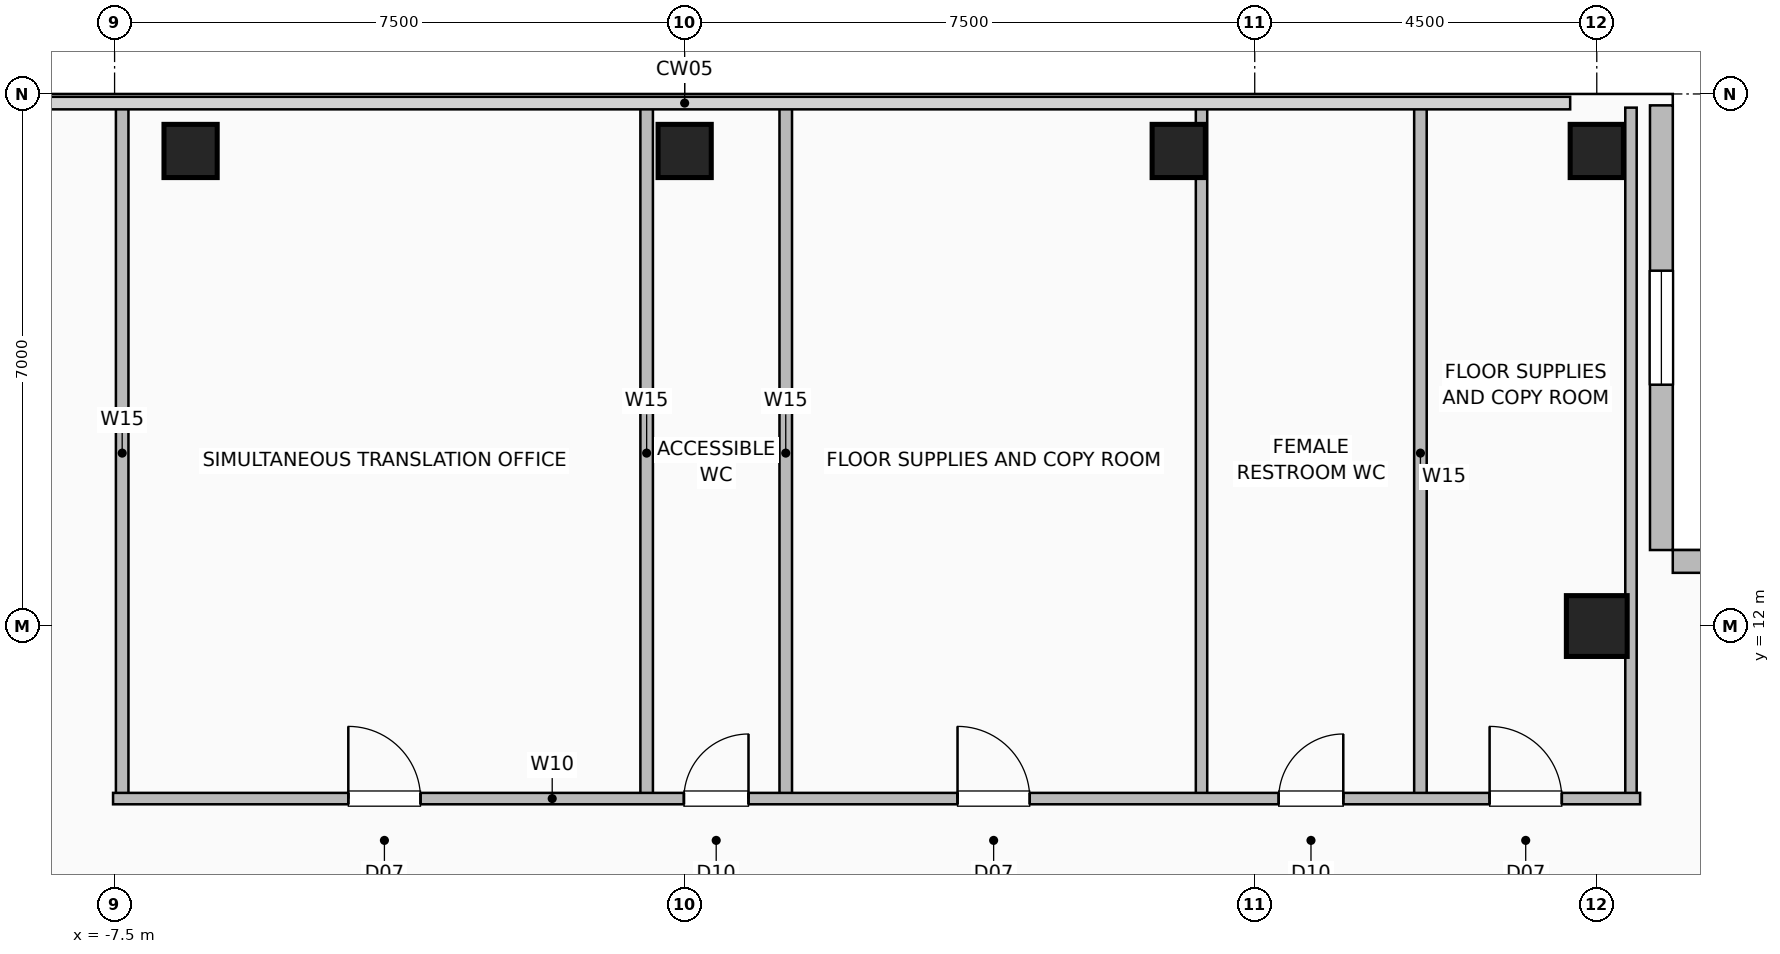
"""IFC4 building model, lengths in metres.
Left out: names, types, materials, properties, quantities, classifications, styles, units other than length and angle.
Written with IfcOpenShell. Run it as: python <this file> out.ifc"""

import sys

from ifc_helpers import new_model, si_unit, direction, frame, frame_2d, origin, origin_2d, place, context, subcontext, project, spatial, rectangle, hollow_rectangle, extrude, element, fill, save


model = new_model("IFC4")
c1 = context("Model", 3, precision=1e-05, world=origin(), true_north=direction((0.0, 1.0)))
c2 = subcontext(c1, "Body", "Model", "MODEL_VIEW")
j1 = project(units=[si_unit("LENGTHUNIT", "METRE"), si_unit("PLANEANGLEUNIT", "RADIAN")], contexts=[c1])
p1 = place(None, origin())
s1 = spatial("IfcSite", under=j1, at=p1, CompositionType="ELEMENT")
p2 = place(p1, origin())
s2 = spatial("IfcBuilding", under=s1, at=p2, CompositionType="ELEMENT")
p3 = place(p2, frame((0.0, 0.0, 243.2)))
s3 = spatial("IfcBuildingStorey", under=s2, at=p3, CompositionType="ELEMENT", Elevation=243.2)
for number, where, z_axis, x_axis in (
    (1, (-6.5, 18.25, 0.0), (0.0, 0.0, 1.0), (1.0, 0.0, 0.0)),
    (2, (0.0, 18.25, 0.0), (0.0, 0.0, 1.0), (1.0, 0.0, 0.0)),
    (3, (6.5, 18.25, 0.0), (0.0, 0.0, 1.0), (1.0, 0.0, 0.0)),
    (4, (12.0, 18.25, 0.0), (0.0, 0.0, 1.0), (1.0, 0.0, 0.0)),
):
    element("IfcColumn", number, at=place(p3, frame(where, z_axis=z_axis, x_axis=x_axis)), inside=s3, PredefinedType="COLUMN", context=c2, shape_type="SweptSolid", body=[
        extrude(hollow_rectangle(XDim=0.7, YDim=0.7, WallThickness=0.035, at=origin_2d()), origin(), (0.0, 0.0, 1.0), 3.6),
    ])
p4 = place(p3, frame((12.0, 12.0, 0.0), z_axis=(0.0, 0.0, 1.0), x_axis=(1.0, 0.0, 0.0)))
e5 = element("IfcColumn", 5, at=p4, inside=s3, PredefinedType="COLUMN", context=c2, shape_type="SweptSolid", body=[
    extrude(hollow_rectangle(XDim=0.8, YDim=0.8, WallThickness=0.04, at=origin_2d()), origin(), (0.0, 0.0, 1.0), 3.6),
])
p5 = place(p3, frame((12.85, 18.85, 0.0), z_axis=(0.0, 0.0, 1.0), x_axis=(0.0, -1.0, 0.0)))
e6 = element("IfcWall", 6, at=p5, inside=s3, PredefinedType="SOLIDWALL", context=c2, shape_type="SweptSolid", body=[
    extrude(rectangle(XDim=5.85, YDim=0.3, at=frame_2d((2.925, 0.0))), origin(), (0.0, 0.0, 1.0), 3.36),
])
p6 = place(p5, frame((2.175, 0.0, 0.9)))
e7 = element("IfcOpeningElement", 7, at=p6, cuts=e6, PredefinedType="OPENING", context=c2, shape_type="SweptSolid", body=[
    extrude(rectangle(XDim=1.5, YDim=1.8, at=frame_2d((0.75, 0.9))), frame((0.0, 0.16, 0.0), z_axis=(0.0, -1.0, 0.0), x_axis=(1.0, 0.0, 0.0)), (0.0, 0.0, 1.0), 0.32),
])
p7 = place(p3, frame((18.85, 12.85, 0.0), z_axis=(0.0, 0.0, 1.0), x_axis=(-1.0, 0.0, 0.0)))
e8 = element("IfcWall", 8, at=p7, inside=s3, PredefinedType="SOLIDWALL", context=c2, shape_type="SweptSolid", body=[
    extrude(rectangle(XDim=5.85, YDim=0.3, at=frame_2d((2.925, 0.0))), origin(), (0.0, 0.0, 1.0), 3.36),
])
for number, where, z_axis, x_axis in (
    (9, (1.33, 9.73, 0.0), (0.0, 0.0, 1.0), (0.0, 1.0, 0.0)),
    (10, (9.68, 9.73, 0.0), (0.0, 0.0, 1.0), (0.0, 1.0, 0.0)),
    (11, (-7.4, 9.73, 0.0), (0.0, 0.0, 1.0), (0.0, 1.0, 0.0)),
    (12, (-0.5, 9.73, 0.0), (0.0, 0.0, 1.0), (0.0, 1.0, 0.0)),
):
    element("IfcWall", number, at=place(p3, frame(where, z_axis=z_axis, x_axis=x_axis)), inside=s3, PredefinedType="PLUMBINGWALL", context=c2, shape_type="SweptSolid", body=[
        extrude(rectangle(XDim=9.09, YDim=0.165, at=frame_2d((4.545, 0.0))), origin(), (0.0, 0.0, 1.0), 3.36),
    ])
for number, where, z_axis, x_axis in (
    (13, (6.8, 9.73, 0.0), (0.0, 0.0, 1.0), (0.0, 1.0, 0.0)),
    (14, (12.45, 9.73, 0.0), (0.0, 0.0, 1.0), (0.0, 1.0, 0.0)),
):
    element("IfcWall", number, at=place(p3, frame(where, z_axis=z_axis, x_axis=x_axis)), inside=s3, PredefinedType="PARTITIONING", context=c2, shape_type="SweptSolid", body=[
        extrude(rectangle(XDim=9.09, YDim=0.15, at=frame_2d((4.545, 0.0))), origin(), (0.0, 0.0, 1.0), 3.36),
    ])
p8 = place(p3, frame((-7.52, 9.73, 0.0), z_axis=(0.0, 0.0, 1.0), x_axis=(1.0, 0.0, 0.0)))
e15 = element("IfcWall", 15, at=p8, inside=s3, PredefinedType="PARTITIONING", context=c2, shape_type="SweptSolid", body=[
    extrude(rectangle(XDim=20.09, YDim=0.15, at=frame_2d((10.045, 0.0))), origin(), (0.0, 0.0, 1.0), 3.36),
])
p9 = place(p8, frame((3.095, 0.0, 0.0)))
e16 = element("IfcOpeningElement", 16, at=p9, cuts=e15, PredefinedType="OPENING", context=c2, shape_type="SweptSolid", body=[
    extrude(rectangle(XDim=0.95, YDim=2.06, at=frame_2d((0.475, 1.03))), frame((0.0, 0.085, 0.0), z_axis=(0.0, -1.0, 0.0), x_axis=(1.0, 0.0, 0.0)), (0.0, 0.0, 1.0), 0.17),
])
p10 = place(p8, frame((7.51, 0.0, 0.0)))
e17 = element("IfcOpeningElement", 17, at=p10, cuts=e15, PredefinedType="OPENING", context=c2, shape_type="SweptSolid", body=[
    extrude(rectangle(XDim=0.85, YDim=2.05, at=frame_2d((0.425, 1.025))), frame((0.0, 0.085, 0.0), z_axis=(0.0, -1.0, 0.0), x_axis=(1.0, 0.0, 0.0)), (0.0, 0.0, 1.0), 0.17),
])
p11 = place(p8, frame((11.11, 0.0, 0.0)))
e18 = element("IfcOpeningElement", 18, at=p11, cuts=e15, PredefinedType="OPENING", context=c2, shape_type="SweptSolid", body=[
    extrude(rectangle(XDim=0.95, YDim=2.06, at=frame_2d((0.475, 1.03))), frame((0.0, 0.085, 0.0), z_axis=(0.0, -1.0, 0.0), x_axis=(1.0, 0.0, 0.0)), (0.0, 0.0, 1.0), 0.17),
])
p12 = place(p8, frame((15.335, 0.0, 0.0)))
e19 = element("IfcOpeningElement", 19, at=p12, cuts=e15, PredefinedType="OPENING", context=c2, shape_type="SweptSolid", body=[
    extrude(rectangle(XDim=0.85, YDim=2.05, at=frame_2d((0.425, 1.025))), frame((0.0, 0.085, 0.0), z_axis=(0.0, -1.0, 0.0), x_axis=(1.0, 0.0, 0.0)), (0.0, 0.0, 1.0), 0.17),
])
p13 = place(p8, frame((18.11, 0.0, 0.0)))
e20 = element("IfcOpeningElement", 20, at=p13, cuts=e15, PredefinedType="OPENING", context=c2, shape_type="SweptSolid", body=[
    extrude(rectangle(XDim=0.95, YDim=2.06, at=frame_2d((0.475, 1.03))), frame((0.0, 0.085, 0.0), z_axis=(0.0, -1.0, 0.0), x_axis=(1.0, 0.0, 0.0)), (0.0, 0.0, 1.0), 0.17),
])
p14 = place(p6, origin())
e21 = element("IfcWindow", 21, at=p14, inside=s3, PartitioningType="SINGLE_PANEL", PredefinedType="WINDOW", context=c2, shape_type="SweptSolid", body=[
    extrude(rectangle(XDim=1.5, YDim=1.8, at=frame_2d((0.75, 0.9))), frame((0.0, 0.03, 0.0), z_axis=(0.0, -1.0, 0.0), x_axis=(1.0, 0.0, 0.0)), (0.0, 0.0, 1.0), 0.06),
])
fill(e7, e21)
p15 = place(p9, origin())
e22 = element("IfcDoor", 22, at=p15, inside=s3, OperationType="SINGLE_SWING_LEFT", PredefinedType="DOOR", context=c2, shape_type="SweptSolid", body=[
    extrude(rectangle(XDim=0.95, YDim=2.06, at=frame_2d((0.475, 1.03))), frame((0.0, 0.025, 0.0), z_axis=(0.0, -1.0, 0.0), x_axis=(1.0, 0.0, 0.0)), (0.0, 0.0, 1.0), 0.05),
])
fill(e16, e22)
p16 = place(p10, origin())
e23 = element("IfcDoor", 23, at=p16, inside=s3, OperationType="SINGLE_SWING_RIGHT", PredefinedType="DOOR", context=c2, shape_type="SweptSolid", body=[
    extrude(rectangle(XDim=0.85, YDim=2.05, at=frame_2d((0.425, 1.025))), frame((0.0, 0.025, 0.0), z_axis=(0.0, -1.0, 0.0), x_axis=(1.0, 0.0, 0.0)), (0.0, 0.0, 1.0), 0.05),
])
fill(e17, e23)
p17 = place(p11, origin())
e24 = element("IfcDoor", 24, at=p17, inside=s3, OperationType="SINGLE_SWING_LEFT", PredefinedType="DOOR", context=c2, shape_type="SweptSolid", body=[
    extrude(rectangle(XDim=0.95, YDim=2.06, at=frame_2d((0.475, 1.03))), frame((0.0, 0.025, 0.0), z_axis=(0.0, -1.0, 0.0), x_axis=(1.0, 0.0, 0.0)), (0.0, 0.0, 1.0), 0.05),
])
fill(e18, e24)
p18 = place(p12, origin())
e25 = element("IfcDoor", 25, at=p18, inside=s3, OperationType="SINGLE_SWING_RIGHT", PredefinedType="DOOR", context=c2, shape_type="SweptSolid", body=[
    extrude(rectangle(XDim=0.85, YDim=2.05, at=frame_2d((0.425, 1.025))), frame((0.0, 0.025, 0.0), z_axis=(0.0, -1.0, 0.0), x_axis=(1.0, 0.0, 0.0)), (0.0, 0.0, 1.0), 0.05),
])
fill(e19, e25)
p19 = place(p13, origin())
e26 = element("IfcDoor", 26, at=p19, inside=s3, OperationType="SINGLE_SWING_LEFT", PredefinedType="DOOR", context=c2, shape_type="SweptSolid", body=[
    extrude(rectangle(XDim=0.95, YDim=2.06, at=frame_2d((0.475, 1.03))), frame((0.0, 0.025, 0.0), z_axis=(0.0, -1.0, 0.0), x_axis=(1.0, 0.0, 0.0)), (0.0, 0.0, 1.0), 0.05),
])
fill(e20, e26)
save(model, sys.argv[1])
